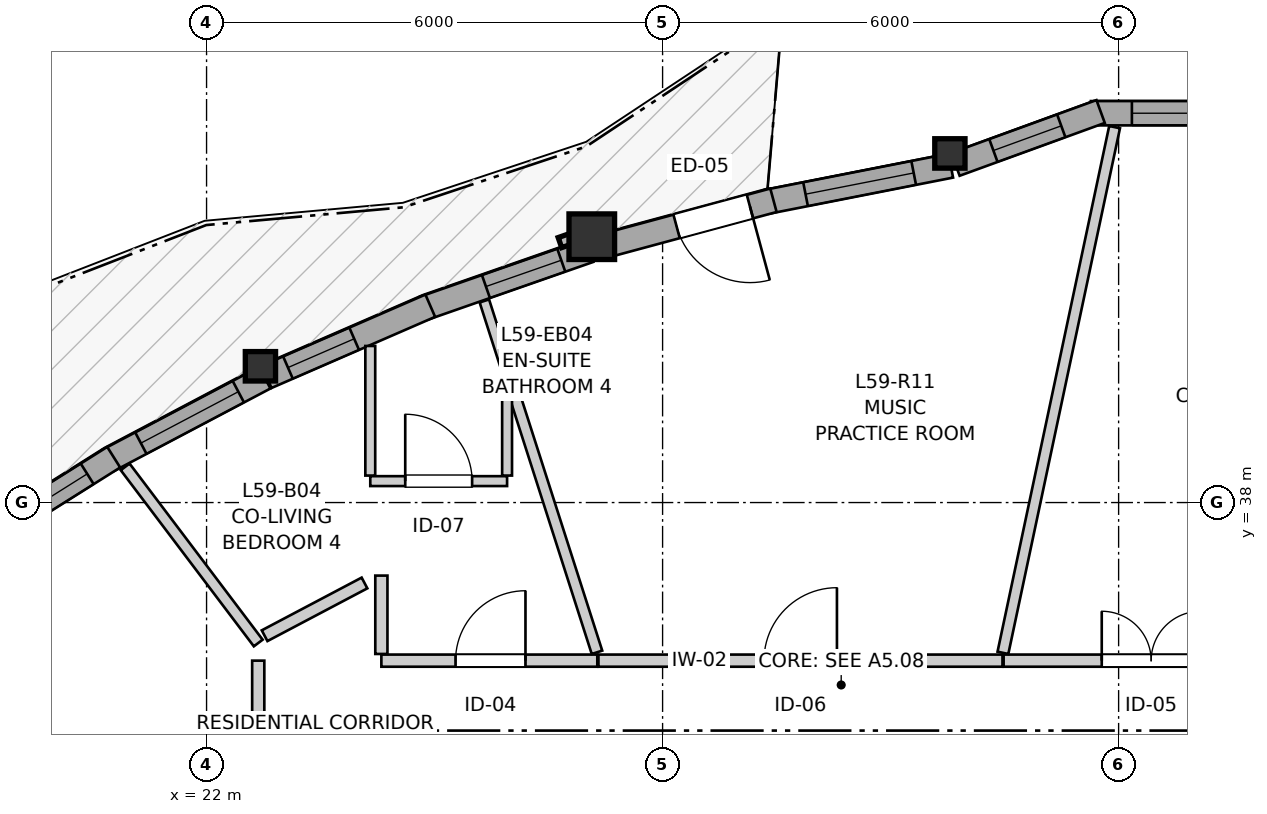
"""IFC4 building model, lengths in metres.
Left out: names, types, materials, properties, quantities, classifications, styles, units other than length and angle.
Written with IfcOpenShell. Run it as: python <this file> out.ifc"""

import sys

from ifc_helpers import new_model, si_unit, direction, frame, frame_2d, origin, origin_2d, place, context, subcontext, project, spatial, rectangle, i_section, extrude, source, transform, mapped, element, fill, save


model = new_model("IFC4")
c1 = context("Model", 3, precision=1e-05, world=origin(), true_north=direction((0.0, 1.0)))
c2 = subcontext(c1, "Body", "Model", "MODEL_VIEW")
j1 = project(units=[si_unit("LENGTHUNIT", "METRE"), si_unit("PLANEANGLEUNIT", "RADIAN")], contexts=[c1])
p1 = place(None, origin())
s1 = spatial("IfcSite", under=j1, at=p1, CompositionType="ELEMENT")
p2 = place(p1, origin())
s2 = spatial("IfcBuilding", under=s1, at=p2, CompositionType="ELEMENT")
p3 = place(p2, frame((0.0, 0.0, 198.8)))
s3 = spatial("IfcBuildingStorey", under=s2, at=p3, CompositionType="ELEMENT", Elevation=198.8)
m1 = source(origin(), c2, "Body", "SweptSolid", [
    extrude(i_section(OverallWidth=0.398, OverallDepth=0.387, WebThickness=0.019, FlangeThickness=0.03, FilletRadius=0.015, at=origin_2d()), origin(), (0.0, 0.0, 1.0), 2.96),
])
p4 = place(p3, frame((31.78, 42.593, 0.0), z_axis=(0.0, 0.0, 1.0), x_axis=(1.0, 0.0, 0.0)))
e1 = element("IfcColumn", 1, at=p4, inside=s3, PredefinedType="PILASTER", context=c2, shape_type="MappedRepresentation", body=[
    mapped(m1, transform((0.0, 0.0, 0.0), x_axis=(1.0, 0.0, 0.0), y_axis=(0.0, 1.0, 0.0), z_axis=(0.0, 0.0, 1.0), scale=1.0)),
])
m2 = source(origin(), c2, "Body", "SweptSolid", [
    extrude(rectangle(XDim=0.6, YDim=0.6, at=origin_2d()), origin(), (0.0, 0.0, 1.0), 2.96),
])
p5 = place(p3, frame((27.069, 41.498, 0.0), z_axis=(0.0, 0.0, 1.0), x_axis=(1.0, 0.0, 0.0)))
e2 = element("IfcColumn", 2, at=p5, inside=s3, PredefinedType="COLUMN", context=c2, shape_type="MappedRepresentation", body=[
    mapped(m2, transform((0.0, 0.0, 0.0), x_axis=(1.0, 0.0, 0.0), y_axis=(0.0, 1.0, 0.0), z_axis=(0.0, 0.0, 1.0), scale=1.0)),
])
p6 = place(p3, frame((22.709, 39.793, 0.0), z_axis=(0.0, 0.0, 1.0), x_axis=(1.0, 0.0, 0.0)))
e3 = element("IfcColumn", 3, at=p6, inside=s3, PredefinedType="PILASTER", context=c2, shape_type="MappedRepresentation", body=[
    mapped(m1, transform((0.0, 0.0, 0.0), x_axis=(1.0, 0.0, 0.0), y_axis=(0.0, 1.0, 0.0), z_axis=(0.0, 0.0, 1.0), scale=1.0)),
])
p7 = place(p3, frame((35.725, 43.122, 0.0), z_axis=(0.0, 0.0, 1.0), x_axis=(-1.0, 0.0, 0.0)))
e4 = element("IfcWall", 4, at=p7, inside=s3, PredefinedType="SOLIDWALL", context=c2, shape_type="SweptSolid", body=[
    extrude(rectangle(XDim=2.09, YDim=0.32, at=frame_2d((1.045, 0.0))), origin(), (0.0, 0.0, 1.0), 2.58),
])
p8 = place(p7, frame((0.301, 0.0, 0.82)))
e5 = element("IfcOpeningElement", 5, at=p8, cuts=e4, PredefinedType="OPENING", context=c2, shape_type="SweptSolid", body=[
    extrude(rectangle(XDim=1.25, YDim=1.35, at=frame_2d((0.625, 0.675))), frame((0.0, 0.17, 0.0), z_axis=(0.0, -1.0, 0.0), x_axis=(1.0, 0.0, 0.0)), (0.0, 0.0, 1.0), 0.34),
])
p9 = place(p3, frame((33.763, 43.145, 0.0), z_axis=(0.0, 0.0, 1.0), x_axis=(-0.939691662178, -0.342022777067, 0.0)))
e6 = element("IfcWall", 6, at=p9, inside=s3, PredefinedType="SOLIDWALL", context=c2, shape_type="SweptSolid", body=[
    extrude(rectangle(XDim=2.032, YDim=0.32, at=frame_2d((1.016, 0.0))), origin(), (0.0, 0.0, 1.0), 2.58),
])
p10 = place(p9, frame((0.551, 0.0, 0.82)))
e7 = element("IfcOpeningElement", 7, at=p10, cuts=e6, PredefinedType="OPENING", context=c2, shape_type="SweptSolid", body=[
    extrude(rectangle(XDim=0.95, YDim=1.35, at=frame_2d((0.475, 0.675))), frame((0.0, 0.17, 0.0), z_axis=(0.0, -1.0, 0.0), x_axis=(1.0, 0.0, 0.0)), (0.0, 0.0, 1.0), 0.34),
])
p11 = place(p3, frame((31.791, 42.432, 0.0), z_axis=(0.0, 0.0, 1.0), x_axis=(-0.981230743763, -0.192837308358, 0.0)))
e8 = element("IfcWall", 8, at=p11, inside=s3, PredefinedType="SOLIDWALL", context=c2, shape_type="SweptSolid", body=[
    extrude(rectangle(XDim=2.464, YDim=0.32, at=frame_2d((1.232, 0.0))), origin(), (0.0, 0.0, 1.0), 2.58),
])
p12 = place(p11, frame((0.497, 0.0, 0.82)))
e9 = element("IfcOpeningElement", 9, at=p12, cuts=e8, PredefinedType="OPENING", context=c2, shape_type="SweptSolid", body=[
    extrude(rectangle(XDim=1.45, YDim=1.25, at=frame_2d((0.725, 0.625))), frame((0.0, 0.17, 0.0), z_axis=(0.0, -1.0, 0.0), x_axis=(1.0, 0.0, 0.0)), (0.0, 0.0, 1.0), 0.34),
])
p13 = place(p3, frame((29.459, 41.977, 0.0), z_axis=(0.0, 0.0, 1.0), x_axis=(-0.965462644558, -0.260541516774, 0.0)))
e10 = element("IfcWall", 10, at=p13, inside=s3, PredefinedType="SOLIDWALL", context=c2, shape_type="SweptSolid", body=[
    extrude(rectangle(XDim=2.343, YDim=0.32, at=frame_2d((1.171, 0.0))), origin(), (0.0, 0.0, 1.0), 2.58),
])
p14 = place(p13, frame((0.32, 0.0, 0.0)))
e11 = element("IfcOpeningElement", 11, at=p14, cuts=e10, PredefinedType="OPENING", context=c2, shape_type="SweptSolid", body=[
    extrude(rectangle(XDim=1.0, YDim=2.1, at=frame_2d((0.5, 1.05))), frame((0.0, 0.17, 0.0), z_axis=(0.0, -1.0, 0.0), x_axis=(1.0, 0.0, 0.0)), (0.0, 0.0, 1.0), 0.34),
])
p15 = place(p3, frame((27.036, 41.317, 0.0), z_axis=(0.0, 0.0, 1.0), x_axis=(-0.944115832513, -0.329613857108, 0.0)))
e12 = element("IfcWall", 12, at=p15, inside=s3, PredefinedType="SOLIDWALL", context=c2, shape_type="SweptSolid", body=[
    extrude(rectangle(XDim=2.303, YDim=0.32, at=frame_2d((1.152, 0.0))), origin(), (0.0, 0.0, 1.0), 2.58),
])
p16 = place(p15, frame((0.391, 0.0, 0.82)))
e13 = element("IfcOpeningElement", 13, at=p16, cuts=e12, PredefinedType="OPENING", context=c2, shape_type="SweptSolid", body=[
    extrude(rectangle(XDim=1.05, YDim=1.45, at=frame_2d((0.525, 0.725))), frame((0.0, 0.17, 0.0), z_axis=(0.0, -1.0, 0.0), x_axis=(1.0, 0.0, 0.0)), (0.0, 0.0, 1.0), 0.34),
])
p17 = place(p3, frame((24.943, 40.59, 0.0), z_axis=(0.0, 0.0, 1.0), x_axis=(-0.917071710038, -0.398722307688, 0.0)))
e14 = element("IfcWall", 14, at=p17, inside=s3, PredefinedType="SOLIDWALL", context=c2, shape_type="SweptSolid", body=[
    extrude(rectangle(XDim=2.347, YDim=0.32, at=frame_2d((1.173, 0.0))), origin(), (0.0, 0.0, 1.0), 2.58),
])
p18 = place(p17, frame((1.091, 0.0, 0.82)))
e15 = element("IfcOpeningElement", 15, at=p18, cuts=e14, PredefinedType="OPENING", context=c2, shape_type="SweptSolid", body=[
    extrude(rectangle(XDim=0.95, YDim=1.35, at=frame_2d((0.475, 0.675))), frame((0.0, 0.17, 0.0), z_axis=(0.0, -1.0, 0.0), x_axis=(1.0, 0.0, 0.0)), (0.0, 0.0, 1.0), 0.34),
])
p19 = place(p3, frame((22.766, 39.642, 0.0), z_axis=(0.0, 0.0, 1.0), x_axis=(-0.884377555637, -0.466772256122, 0.0)))
e16 = element("IfcWall", 16, at=p19, inside=s3, PredefinedType="SOLIDWALL", context=c2, shape_type="SweptSolid", body=[
    extrude(rectangle(XDim=2.334, YDim=0.32, at=frame_2d((1.167, 0.0))), origin(), (0.0, 0.0, 1.0), 2.58),
])
p20 = place(p19, frame((0.393, 0.0, 0.82)))
e17 = element("IfcOpeningElement", 17, at=p20, cuts=e16, PredefinedType="OPENING", context=c2, shape_type="SweptSolid", body=[
    extrude(rectangle(XDim=1.45, YDim=1.25, at=frame_2d((0.725, 0.625))), frame((0.0, 0.17, 0.0), z_axis=(0.0, -1.0, 0.0), x_axis=(1.0, 0.0, 0.0)), (0.0, 0.0, 1.0), 0.34),
])
p21 = place(p3, frame((20.778, 38.597, 0.0), z_axis=(0.0, 0.0, 1.0), x_axis=(-0.84639489148, -0.532555807101, 0.0)))
e18 = element("IfcWall", 18, at=p21, inside=s3, PredefinedType="SOLIDWALL", context=c2, shape_type="SweptSolid", body=[
    extrude(rectangle(XDim=2.264, YDim=0.32, at=frame_2d((1.132, 0.0))), origin(), (0.0, 0.0, 1.0), 2.58),
])
p22 = place(p21, frame((0.412, 0.0, 0.82)))
e19 = element("IfcOpeningElement", 19, at=p22, cuts=e18, PredefinedType="OPENING", context=c2, shape_type="SweptSolid", body=[
    extrude(rectangle(XDim=1.45, YDim=1.25, at=frame_2d((0.725, 0.625))), frame((0.0, 0.17, 0.0), z_axis=(0.0, -1.0, 0.0), x_axis=(1.0, 0.0, 0.0)), (0.0, 0.0, 1.0), 0.34),
])
p23 = place(p3, frame((27.156, 35.92, 0.0), z_axis=(0.0, 0.0, 1.0), x_axis=(1.0, 0.0, 0.0)))
e20 = element("IfcWall", 20, at=p23, inside=s3, PredefinedType="PARTITIONING", context=c2, shape_type="SweptSolid", body=[
    extrude(rectangle(XDim=5.316, YDim=0.16, at=frame_2d((2.658, 0.0))), origin(), (0.0, 0.0, 1.0), 2.628),
])
p24 = place(p23, frame((2.178, 0.0, 0.0)))
e21 = element("IfcOpeningElement", 21, at=p24, cuts=e20, PredefinedType="OPENING", context=c2, shape_type="SweptSolid", body=[
    extrude(rectangle(XDim=0.96, YDim=2.1, at=frame_2d((0.48, 1.05))), frame((0.0, 0.09, 0.0), z_axis=(0.0, -1.0, 0.0), x_axis=(1.0, 0.0, 0.0)), (0.0, 0.0, 1.0), 0.18),
])
p25 = place(p3, frame((32.487, 35.92, 0.0), z_axis=(0.0, 0.0, 1.0), x_axis=(1.0, 0.0, 0.0)))
e22 = element("IfcWall", 22, at=p25, inside=s3, PredefinedType="PARTITIONING", context=c2, shape_type="SweptSolid", body=[
    extrude(rectangle(XDim=3.913, YDim=0.16, at=frame_2d((1.957, 0.0))), origin(), (0.0, 0.0, 1.0), 2.628),
])
p26 = place(p25, frame((1.291, 0.0, 0.0)))
e23 = element("IfcOpeningElement", 23, at=p26, cuts=e22, PredefinedType="OPENING", context=c2, shape_type="SweptSolid", body=[
    extrude(rectangle(XDim=1.3, YDim=2.1, at=frame_2d((0.65, 1.05))), frame((0.0, 0.09, 0.0), z_axis=(0.0, -1.0, 0.0), x_axis=(1.0, 0.0, 0.0)), (0.0, 0.0, 1.0), 0.18),
])
p27 = place(p3, frame((24.3, 35.92, 0.0), z_axis=(0.0, 0.0, 1.0), x_axis=(1.0, 0.0, 0.0)))
e24 = element("IfcWall", 24, at=p27, inside=s3, PredefinedType="PARTITIONING", context=c2, shape_type="SweptSolid", body=[
    extrude(rectangle(XDim=2.841, YDim=0.16, at=frame_2d((1.42, 0.0))), origin(), (0.0, 0.0, 1.0), 2.96),
])
p28 = place(p27, frame((0.976, 0.0, 0.0)))
e25 = element("IfcOpeningElement", 25, at=p28, cuts=e24, PredefinedType="OPENING", context=c2, shape_type="SweptSolid", body=[
    extrude(rectangle(XDim=0.92, YDim=2.1, at=frame_2d((0.46, 1.05))), frame((0.0, 0.09, 0.0), z_axis=(0.0, -1.0, 0.0), x_axis=(1.0, 0.0, 0.0)), (0.0, 0.0, 1.0), 0.18),
])
p29 = place(p3, frame((24.154, 38.282, 0.0), z_axis=(0.0, 0.0, 1.0), x_axis=(1.0, 0.0, 0.0)))
e26 = element("IfcWall", 26, at=p29, inside=s3, PredefinedType="PARTITIONING", context=c2, shape_type="SweptSolid", body=[
    extrude(rectangle(XDim=1.8, YDim=0.13, at=frame_2d((0.9, 0.0))), origin(), (0.0, 0.0, 1.0), 2.96),
])
p30 = place(p29, frame((0.46, 0.0, 0.0)))
e27 = element("IfcOpeningElement", 27, at=p30, cuts=e26, PredefinedType="OPENING", context=c2, shape_type="SweptSolid", body=[
    extrude(rectangle(XDim=0.88, YDim=2.05, at=frame_2d((0.44, 1.025))), frame((0.0, 0.075, 0.0), z_axis=(0.0, -1.0, 0.0), x_axis=(1.0, 0.0, 0.0)), (0.0, 0.0, 1.0), 0.15),
])
p31 = place(p3, frame((32.478, 36.023, 0.0), z_axis=(0.0, 0.0, 1.0), x_axis=(0.207795571792, 0.978172275391, 0.0)))
e28 = element("IfcWall", 28, at=p31, inside=s3, PredefinedType="PARTITIONING", context=c2, shape_type="SweptSolid", body=[
    extrude(rectangle(XDim=7.071, YDim=0.145, at=frame_2d((3.535, 0.0))), origin(), (0.0, 0.0, 1.0), 2.96),
])
p32 = place(p3, frame((25.939, 39.767, 0.0), z_axis=(0.0, 0.0, 1.0), x_axis=(0.305195538028, -0.952289705693, 0.0)))
e29 = element("IfcWall", 29, at=p32, inside=s3, PredefinedType="PARTITIONING", context=c2, shape_type="SweptSolid", body=[
    extrude(rectangle(XDim=3.925, YDim=0.145, at=frame_2d((1.962, 0.0))), origin(), (0.0, 0.0, 1.0), 2.96),
])
p33 = place(p3, frame((20.929, 38.469, 0.0), z_axis=(0.0, 0.0, 1.0), x_axis=(0.602847358209, -0.797856542682, 0.0)))
e30 = element("IfcWall", 30, at=p33, inside=s3, PredefinedType="PARTITIONING", context=c2, shape_type="SweptSolid", body=[
    extrude(rectangle(XDim=2.905, YDim=0.145, at=frame_2d((1.452, 0.0))), origin(), (0.0, 0.0, 1.0), 2.96),
])
p34 = place(p3, frame((24.154, 38.355, 0.0), z_axis=(0.0, 0.0, 1.0), x_axis=(0.0, 1.0, 0.0)))
e31 = element("IfcWall", 31, at=p34, inside=s3, PredefinedType="PARTITIONING", context=c2, shape_type="SweptSolid", body=[
    extrude(rectangle(XDim=1.705, YDim=0.13, at=frame_2d((0.853, 0.0))), origin(), (0.0, 0.0, 1.0), 2.96),
])
p35 = place(p3, frame((22.68, 34.315, 0.0), z_axis=(0.0, 0.0, 1.0), x_axis=(0.0, 1.0, 0.0)))
e32 = element("IfcWall", 32, at=p35, inside=s3, PredefinedType="PARTITIONING", context=c2, shape_type="SweptSolid", body=[
    extrude(rectangle(XDim=1.605, YDim=0.16, at=frame_2d((0.802, 0.0))), origin(), (0.0, 0.0, 1.0), 2.96),
])
p36 = place(p3, frame((22.764, 36.248, 0.0), z_axis=(0.0, 0.0, 1.0), x_axis=(0.884318813942, 0.466883535059, 0.0)))
e33 = element("IfcWall", 33, at=p36, inside=s3, PredefinedType="PARTITIONING", context=c2, shape_type="SweptSolid", body=[
    extrude(rectangle(XDim=1.486, YDim=0.16, at=frame_2d((0.743, 0.0))), origin(), (0.0, 0.0, 1.0), 2.96),
])
p37 = place(p3, frame((25.954, 38.355, 0.0), z_axis=(0.0, 0.0, 1.0), x_axis=(0.0, 1.0, 0.0)))
e34 = element("IfcWall", 34, at=p37, inside=s3, PredefinedType="PARTITIONING", context=c2, shape_type="SweptSolid", body=[
    extrude(rectangle(XDim=1.125, YDim=0.13, at=frame_2d((0.562, 0.0))), origin(), (0.0, 0.0, 1.0), 2.96),
])
p38 = place(p3, frame((24.3, 36.008, 0.0), z_axis=(0.0, 0.0, 1.0), x_axis=(0.0, 1.0, 0.0)))
e35 = element("IfcWall", 35, at=p38, inside=s3, PredefinedType="PARTITIONING", context=c2, shape_type="SweptSolid", body=[
    extrude(rectangle(XDim=1.031, YDim=0.16, at=frame_2d((0.516, 0.0))), origin(), (0.0, 0.0, 1.0), 2.96),
])
p39 = place(p3, frame((25.655, 40.652, 0.0), z_axis=(0.0, 0.0, 1.0), x_axis=(0.305317972149, -0.952250458589, 0.0)))
e36 = element("IfcWall", 36, at=p39, inside=s3, PredefinedType="PARTITIONING", context=c2, shape_type="SweptSolid", body=[
    extrude(rectangle(XDim=0.915, YDim=0.13, at=frame_2d((0.458, 0.0))), origin(), (0.0, 0.0, 1.0), 2.96),
])
m3 = source(origin(), c2, "Body", "SweptSolid", [
    extrude(rectangle(XDim=1.25, YDim=1.35, at=frame_2d((0.625, 0.675))), frame((0.0, 0.03, 0.0), z_axis=(0.0, -1.0, 0.0), x_axis=(1.0, 0.0, 0.0)), (0.0, 0.0, 1.0), 0.06),
])
p40 = place(p8, origin())
e37 = element("IfcWindow", 37, at=p40, inside=s3, PartitioningType="SINGLE_PANEL", PredefinedType="WINDOW", context=c2, shape_type="MappedRepresentation", body=[
    mapped(m3, transform((0.0, 0.0, 0.0), x_axis=(1.0, 0.0, 0.0), y_axis=(0.0, 1.0, 0.0), z_axis=(0.0, 0.0, 1.0), scale=1.0)),
])
fill(e5, e37)
m4 = source(origin(), c2, "Body", "SweptSolid", [
    extrude(rectangle(XDim=0.95, YDim=1.35, at=frame_2d((0.475, 0.675))), frame((0.0, 0.03, 0.0), z_axis=(0.0, -1.0, 0.0), x_axis=(1.0, 0.0, 0.0)), (0.0, 0.0, 1.0), 0.06),
])
p41 = place(p10, origin())
e38 = element("IfcWindow", 38, at=p41, inside=s3, PartitioningType="SINGLE_PANEL", PredefinedType="WINDOW", context=c2, shape_type="MappedRepresentation", body=[
    mapped(m4, transform((0.0, 0.0, 0.0), x_axis=(1.0, 0.0, 0.0), y_axis=(0.0, 1.0, 0.0), z_axis=(0.0, 0.0, 1.0), scale=1.0)),
])
fill(e7, e38)
m5 = source(origin(), c2, "Body", "SweptSolid", [
    extrude(rectangle(XDim=1.45, YDim=1.25, at=frame_2d((0.725, 0.625))), frame((0.0, 0.03, 0.0), z_axis=(0.0, -1.0, 0.0), x_axis=(1.0, 0.0, 0.0)), (0.0, 0.0, 1.0), 0.06),
])
p42 = place(p12, origin())
e39 = element("IfcWindow", 39, at=p42, inside=s3, PartitioningType="SINGLE_PANEL", PredefinedType="WINDOW", context=c2, shape_type="MappedRepresentation", body=[
    mapped(m5, transform((0.0, 0.0, 0.0), x_axis=(1.0, 0.0, 0.0), y_axis=(0.0, 1.0, 0.0), z_axis=(0.0, 0.0, 1.0), scale=1.0)),
])
fill(e9, e39)
m6 = source(origin(), c2, "Body", "SweptSolid", [
    extrude(rectangle(XDim=1.05, YDim=1.45, at=frame_2d((0.525, 0.725))), frame((0.0, 0.03, 0.0), z_axis=(0.0, -1.0, 0.0), x_axis=(1.0, 0.0, 0.0)), (0.0, 0.0, 1.0), 0.06),
])
p43 = place(p16, origin())
e40 = element("IfcWindow", 40, at=p43, inside=s3, PartitioningType="SINGLE_PANEL", PredefinedType="WINDOW", context=c2, shape_type="MappedRepresentation", body=[
    mapped(m6, transform((0.0, 0.0, 0.0), x_axis=(1.0, 0.0, 0.0), y_axis=(0.0, 1.0, 0.0), z_axis=(0.0, 0.0, 1.0), scale=1.0)),
])
fill(e13, e40)
p44 = place(p18, origin())
e41 = element("IfcWindow", 41, at=p44, inside=s3, PartitioningType="SINGLE_PANEL", PredefinedType="WINDOW", context=c2, shape_type="MappedRepresentation", body=[
    mapped(m4, transform((0.0, 0.0, 0.0), x_axis=(1.0, 0.0, 0.0), y_axis=(0.0, 1.0, 0.0), z_axis=(0.0, 0.0, 1.0), scale=1.0)),
])
fill(e15, e41)
p45 = place(p20, origin())
e42 = element("IfcWindow", 42, at=p45, inside=s3, PartitioningType="SINGLE_PANEL", PredefinedType="WINDOW", context=c2, shape_type="MappedRepresentation", body=[
    mapped(m5, transform((0.0, 0.0, 0.0), x_axis=(1.0, 0.0, 0.0), y_axis=(0.0, 1.0, 0.0), z_axis=(0.0, 0.0, 1.0), scale=1.0)),
])
fill(e17, e42)
p46 = place(p22, origin())
e43 = element("IfcWindow", 43, at=p46, inside=s3, PartitioningType="SINGLE_PANEL", PredefinedType="WINDOW", context=c2, shape_type="MappedRepresentation", body=[
    mapped(m5, transform((0.0, 0.0, 0.0), x_axis=(1.0, 0.0, 0.0), y_axis=(0.0, 1.0, 0.0), z_axis=(0.0, 0.0, 1.0), scale=1.0)),
])
fill(e19, e43)
m7 = source(origin(), c2, "Body", "SweptSolid", [
    extrude(rectangle(XDim=1.0, YDim=2.1, at=frame_2d((0.5, 1.05))), frame((0.0, 0.025, 0.0), z_axis=(0.0, -1.0, 0.0), x_axis=(1.0, 0.0, 0.0)), (0.0, 0.0, 1.0), 0.05),
])
p47 = place(p14, origin())
e44 = element("IfcDoor", 44, at=p47, inside=s3, OperationType="SINGLE_SWING_LEFT", PredefinedType="DOOR", context=c2, shape_type="MappedRepresentation", body=[
    mapped(m7, transform((0.0, 0.0, 0.0), x_axis=(1.0, 0.0, 0.0), y_axis=(0.0, 1.0, 0.0), z_axis=(0.0, 0.0, 1.0), scale=1.0)),
])
fill(e11, e44)
m8 = source(origin(), c2, "Body", "SweptSolid", [
    extrude(rectangle(XDim=0.96, YDim=2.1, at=frame_2d((0.48, 1.05))), frame((0.0, 0.025, 0.0), z_axis=(0.0, -1.0, 0.0), x_axis=(1.0, 0.0, 0.0)), (0.0, 0.0, 1.0), 0.05),
])
p48 = place(p24, origin())
e45 = element("IfcDoor", 45, at=p48, inside=s3, OperationType="SINGLE_SWING_RIGHT", PredefinedType="DOOR", context=c2, shape_type="MappedRepresentation", body=[
    mapped(m8, transform((0.0, 0.0, 0.0), x_axis=(1.0, 0.0, 0.0), y_axis=(0.0, 1.0, 0.0), z_axis=(0.0, 0.0, 1.0), scale=1.0)),
])
fill(e21, e45)
m9 = source(origin(), c2, "Body", "SweptSolid", [
    extrude(rectangle(XDim=1.3, YDim=2.1, at=frame_2d((0.65, 1.05))), frame((0.0, 0.025, 0.0), z_axis=(0.0, -1.0, 0.0), x_axis=(1.0, 0.0, 0.0)), (0.0, 0.0, 1.0), 0.05),
])
p49 = place(p26, origin())
e46 = element("IfcDoor", 46, at=p49, inside=s3, OperationType="DOUBLE_DOOR_SINGLE_SWING", PredefinedType="DOOR", context=c2, shape_type="MappedRepresentation", body=[
    mapped(m9, transform((0.0, 0.0, 0.0), x_axis=(1.0, 0.0, 0.0), y_axis=(0.0, 1.0, 0.0), z_axis=(0.0, 0.0, 1.0), scale=1.0)),
])
fill(e23, e46)
m10 = source(origin(), c2, "Body", "SweptSolid", [
    extrude(rectangle(XDim=0.92, YDim=2.1, at=frame_2d((0.46, 1.05))), frame((0.0, 0.025, 0.0), z_axis=(0.0, -1.0, 0.0), x_axis=(1.0, 0.0, 0.0)), (0.0, 0.0, 1.0), 0.05),
])
p50 = place(p28, origin())
e47 = element("IfcDoor", 47, at=p50, inside=s3, OperationType="SINGLE_SWING_RIGHT", PredefinedType="DOOR", context=c2, shape_type="MappedRepresentation", body=[
    mapped(m10, transform((0.0, 0.0, 0.0), x_axis=(1.0, 0.0, 0.0), y_axis=(0.0, 1.0, 0.0), z_axis=(0.0, 0.0, 1.0), scale=1.0)),
])
fill(e25, e47)
m11 = source(origin(), c2, "Body", "SweptSolid", [
    extrude(rectangle(XDim=0.88, YDim=2.05, at=frame_2d((0.44, 1.025))), frame((0.0, 0.025, 0.0), z_axis=(0.0, -1.0, 0.0), x_axis=(1.0, 0.0, 0.0)), (0.0, 0.0, 1.0), 0.05),
])
p51 = place(p30, origin())
e48 = element("IfcDoor", 48, at=p51, inside=s3, OperationType="SINGLE_SWING_LEFT", PredefinedType="DOOR", context=c2, shape_type="MappedRepresentation", body=[
    mapped(m11, transform((0.0, 0.0, 0.0), x_axis=(1.0, 0.0, 0.0), y_axis=(0.0, 1.0, 0.0), z_axis=(0.0, 0.0, 1.0), scale=1.0)),
])
fill(e27, e48)
save(model, sys.argv[1])
